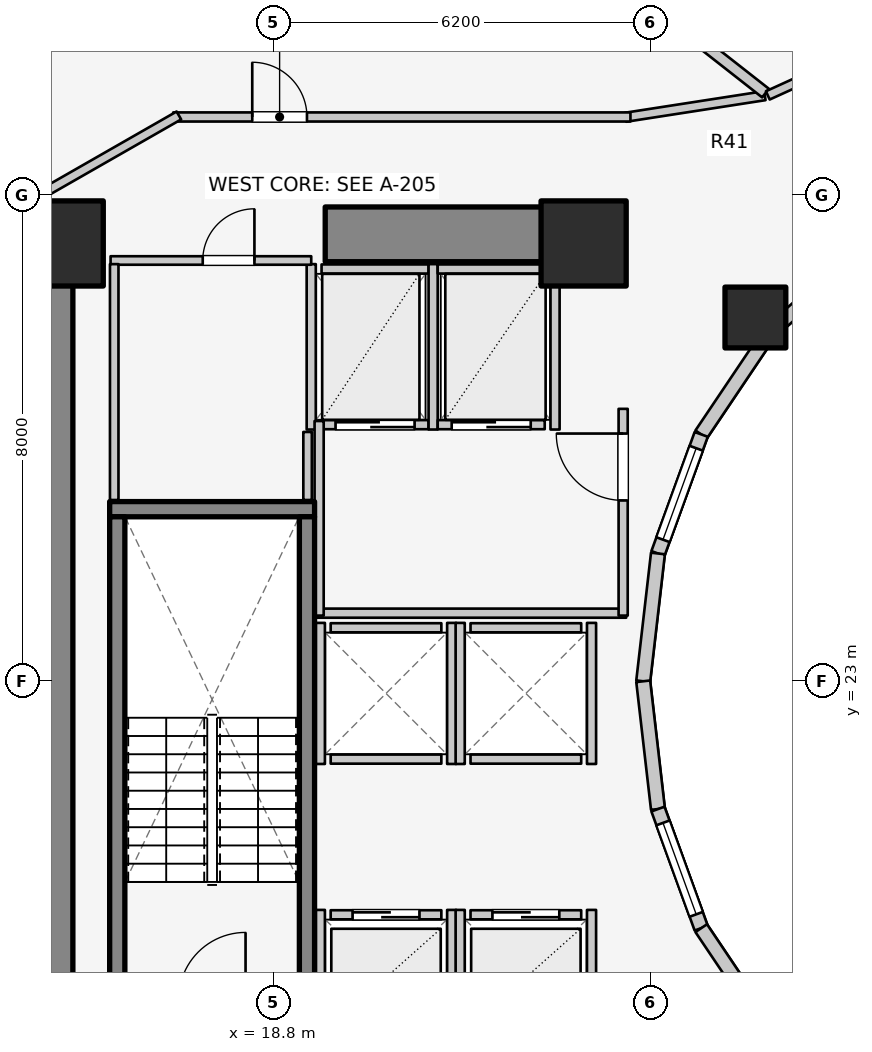
"""IFC4 building model, lengths in metres.
Left out: names, types, materials, properties, quantities, classifications, styles, units other than length and angle.
Written with IfcOpenShell. Run it as: python <this file> out.ifc"""

import sys

from ifc_helpers import new_model, si_unit, direction, frame, frame_2d, origin, origin_2d, place, context, subcontext, project, spatial, rectangle, extrude, element, fill, save


model = new_model("IFC4")
c1 = context("Model", 3, precision=1e-05, world=origin(), true_north=direction((0.0, 1.0)))
c2 = subcontext(c1, "Body", "Model", "MODEL_VIEW")
j1 = project(units=[si_unit("LENGTHUNIT", "METRE"), si_unit("PLANEANGLEUNIT", "RADIAN")], contexts=[c1])
p1 = place(None, origin())
s1 = spatial("IfcSite", under=j1, at=p1, CompositionType="ELEMENT")
p2 = place(p1, origin())
s2 = spatial("IfcBuilding", under=s1, at=p2, CompositionType="ELEMENT")
p3 = place(p2, frame((0.0, 0.0, 36.9)))
s3 = spatial("IfcBuildingStorey", under=s2, at=p3, CompositionType="ELEMENT", Elevation=36.9)
p4 = place(p3, frame((15.05, 17.05, 0.0), z_axis=(0.0, 0.0, 1.0), x_axis=(0.0, 1.0, 0.0)))
e1 = element("IfcWall", 1, at=p4, inside=s3, PredefinedType="SHEAR", context=c2, shape_type="SweptSolid", body=[
    extrude(rectangle(XDim=12.8, YDim=0.9, at=frame_2d((6.4, 0.0))), origin(), (0.0, 0.0, 1.0), 3.1),
])
p5 = place(p3, frame((19.65, 30.35, 0.0), z_axis=(0.0, 0.0, 1.0), x_axis=(1.0, 0.0, 0.0)))
e2 = element("IfcWall", 2, at=p5, inside=s3, PredefinedType="SHEAR", context=c2, shape_type="SweptSolid", body=[
    extrude(rectangle(XDim=4.5, YDim=0.9, at=frame_2d((2.25, 0.0))), origin(), (0.0, 0.0, 1.0), 3.1),
])
p6 = place(p3, frame((16.105, 25.83, 0.0), z_axis=(0.0, 0.0, 1.0), x_axis=(1.0, 0.0, 0.0)))
e3 = element("IfcWall", 3, at=p6, inside=s3, PredefinedType="SOLIDWALL", context=c2, shape_type="SweptSolid", body=[
    extrude(rectangle(XDim=3.37, YDim=0.25, at=frame_2d((1.685, 0.0))), origin(), (0.0, 0.0, 1.0), 3.1),
])
for number, where, z_axis, x_axis in (
    (4, (16.23, 17.895, 0.0), (0.0, 0.0, 1.0), (0.0, 1.0, 0.0)),
    (5, (19.35, 17.895, 0.0), (0.0, 0.0, 1.0), (0.0, 1.0, 0.0)),
):
    element("IfcWall", number, at=place(p3, frame(where, z_axis=z_axis, x_axis=x_axis)), inside=s3, PredefinedType="SOLIDWALL", context=c2, shape_type="SweptSolid", body=[
        extrude(rectangle(XDim=7.81, YDim=0.25, at=frame_2d((3.905, 0.0))), origin(), (0.0, 0.0, 1.0), 3.1),
    ])
for number, where, z_axis, x_axis in (
    (6, (23.9, 30.2, 0.0), (0.0, 0.0, 1.0), (1.0, 0.0, 0.0)),
    (7, (15.3, 30.2, 0.0), (0.0, 0.0, 1.0), (1.0, 0.0, 0.0)),
):
    element("IfcColumn", number, at=place(p3, frame(where, z_axis=z_axis, x_axis=x_axis)), inside=s3, PredefinedType="COLUMN", context=c2, shape_type="SweptSolid", body=[
        extrude(rectangle(XDim=1.4, YDim=1.4, at=origin_2d()), origin(), (0.0, 0.0, 1.0), 3.1),
    ])
p7 = place(p3, frame((26.725, 28.982, 0.0), z_axis=(0.0, 0.0, 1.0), x_axis=(1.0, 0.0, 0.0)))
e8 = element("IfcColumn", 8, at=p7, inside=s3, PredefinedType="COLUMN", context=c2, shape_type="SweptSolid", body=[
    extrude(rectangle(XDim=1.0, YDim=1.0, at=origin_2d()), origin(), (0.0, 0.0, 1.0), 3.1),
])
p8 = place(p3, frame((28.44, 30.032, 0.0), z_axis=(0.0, 0.0, 1.0), x_axis=(-0.752576694707, -0.658504607869, 0.0)))
e9 = element("IfcWall", 9, at=p8, inside=s3, PredefinedType="STANDARD", context=c2, shape_type="SweptSolid", body=[
    extrude(rectangle(XDim=1.959, YDim=0.23, at=frame_2d((0.98, 0.0))), origin(), (0.0, 0.0, 1.0), 2.16),
])
p9 = place(p3, frame((26.965, 28.742, 0.0), z_axis=(0.0, 0.0, 1.0), x_axis=(-0.558197800898, -0.829707909492, 0.0)))
e10 = element("IfcWall", 10, at=p9, inside=s3, PredefinedType="STANDARD", context=c2, shape_type="SweptSolid", body=[
    extrude(rectangle(XDim=2.027, YDim=0.23, at=frame_2d((1.013, 0.0))), origin(), (0.0, 0.0, 1.0), 2.16),
])
p10 = place(p3, frame((25.834, 27.06, 0.0), z_axis=(0.0, 0.0, 1.0), x_axis=(-0.341423187295, -0.93990968033, 0.0)))
e11 = element("IfcWall", 11, at=p10, inside=s3, PredefinedType="STANDARD", context=c2, shape_type="SweptSolid", body=[
    extrude(rectangle(XDim=2.084, YDim=0.23, at=frame_2d((1.042, 0.0))), origin(), (0.0, 0.0, 1.0), 2.84),
])
p11 = place(p10, frame((0.242, 0.0, 0.85)))
e12 = element("IfcOpeningElement", 12, at=p11, cuts=e11, PredefinedType="OPENING", context=c2, shape_type="SweptSolid", body=[
    extrude(rectangle(XDim=1.6, YDim=1.65, at=frame_2d((0.8, 0.825))), frame((0.0, 0.125, 0.0), z_axis=(0.0, -1.0, 0.0), x_axis=(1.0, 0.0, 0.0)), (0.0, 0.0, 1.0), 0.25),
])
for number, where, z_axis, x_axis in (
    (13, (25.123, 25.102, 0.0), (0.0, 0.0, 1.0), (-0.115, -0.993, 0.0)),
    (14, (24.88, 23.0, 0.0), (0.0, 0.0, 1.0), (0.115, -0.993, 0.0)),
):
    element("IfcWall", number, at=place(p3, frame(where, z_axis=z_axis, x_axis=x_axis)), inside=s3, PredefinedType="STANDARD", context=c2, shape_type="SweptSolid", body=[
        extrude(rectangle(XDim=2.115, YDim=0.23, at=frame_2d((1.058, 0.0))), origin(), (0.0, 0.0, 1.0), 2.84),
    ])
p12 = place(p3, frame((25.123, 20.898, 0.0), z_axis=(0.0, 0.0, 1.0), x_axis=(0.341423187295, -0.93990968033, 0.0)))
e15 = element("IfcWall", 15, at=p12, inside=s3, PredefinedType="STANDARD", context=c2, shape_type="SweptSolid", body=[
    extrude(rectangle(XDim=2.084, YDim=0.23, at=frame_2d((1.042, 0.0))), origin(), (0.0, 0.0, 1.0), 2.84),
])
p13 = place(p12, frame((0.242, 0.0, 0.85)))
e16 = element("IfcOpeningElement", 16, at=p13, cuts=e15, PredefinedType="OPENING", context=c2, shape_type="SweptSolid", body=[
    extrude(rectangle(XDim=1.6, YDim=1.65, at=frame_2d((0.8, 0.825))), frame((0.0, 0.125, 0.0), z_axis=(0.0, -1.0, 0.0), x_axis=(1.0, 0.0, 0.0)), (0.0, 0.0, 1.0), 0.25),
])
p14 = place(p3, frame((25.834, 18.94, 0.0), z_axis=(0.0, 0.0, 1.0), x_axis=(0.558197800898, -0.829707909492, 0.0)))
e17 = element("IfcWall", 17, at=p14, inside=s3, PredefinedType="STANDARD", context=c2, shape_type="SweptSolid", body=[
    extrude(rectangle(XDim=2.027, YDim=0.23, at=frame_2d((1.013, 0.0))), origin(), (0.0, 0.0, 1.0), 2.16),
])
p15 = place(p3, frame((19.74, 19.16, 0.0), z_axis=(0.0, 0.0, 1.0), x_axis=(1.0, 0.0, 0.0)))
e18 = element("IfcWall", 18, at=p15, inside=s3, PredefinedType="SOLIDWALL", context=c2, shape_type="SweptSolid", body=[
    extrude(rectangle(XDim=1.82, YDim=0.15, at=frame_2d((0.91, 0.0))), origin(), (0.0, 0.0, 1.0), 2.855),
])
p16 = place(p15, frame((0.36, 0.0, 0.0)))
e19 = element("IfcOpeningElement", 19, at=p16, cuts=e18, PredefinedType="OPENING", context=c2, shape_type="SweptSolid", body=[
    extrude(rectangle(XDim=1.1, YDim=2.1, at=frame_2d((0.55, 1.05))), frame((0.0, 0.085, 0.0), z_axis=(0.0, -1.0, 0.0), x_axis=(1.0, 0.0, 0.0)), (0.0, 0.0, 1.0), 0.17),
])
p17 = place(p3, frame((19.57, 17.02, 0.0), z_axis=(0.0, 0.0, 1.0), x_axis=(0.0, 1.0, 0.0)))
e20 = element("IfcWall", 20, at=p17, inside=s3, PredefinedType="SOLIDWALL", context=c2, shape_type="SweptSolid", body=[
    extrude(rectangle(XDim=2.22, YDim=0.15, at=frame_2d((1.11, 0.0))), origin(), (0.0, 0.0, 1.0), 2.12),
])
p18 = place(p3, frame((21.73, 17.02, 0.0), z_axis=(0.0, 0.0, 1.0), x_axis=(0.0, 1.0, 0.0)))
e21 = element("IfcWall", 21, at=p18, inside=s3, PredefinedType="SOLIDWALL", context=c2, shape_type="SweptSolid", body=[
    extrude(rectangle(XDim=2.22, YDim=0.15, at=frame_2d((1.11, 0.0))), origin(), (0.0, 0.0, 1.0), 2.855),
])
p19 = place(p3, frame((22.04, 19.16, 0.0), z_axis=(0.0, 0.0, 1.0), x_axis=(1.0, 0.0, 0.0)))
e22 = element("IfcWall", 22, at=p19, inside=s3, PredefinedType="SOLIDWALL", context=c2, shape_type="SweptSolid", body=[
    extrude(rectangle(XDim=1.82, YDim=0.15, at=frame_2d((0.91, 0.0))), origin(), (0.0, 0.0, 1.0), 2.12),
])
p20 = place(p19, frame((0.36, 0.0, 0.0)))
e23 = element("IfcOpeningElement", 23, at=p20, cuts=e22, PredefinedType="OPENING", context=c2, shape_type="SweptSolid", body=[
    extrude(rectangle(XDim=1.1, YDim=2.1, at=frame_2d((0.55, 1.05))), frame((0.0, 0.085, 0.0), z_axis=(0.0, -1.0, 0.0), x_axis=(1.0, 0.0, 0.0)), (0.0, 0.0, 1.0), 0.17),
])
p21 = place(p3, frame((21.87, 17.02, 0.0), z_axis=(0.0, 0.0, 1.0), x_axis=(0.0, 1.0, 0.0)))
e24 = element("IfcWall", 24, at=p21, inside=s3, PredefinedType="SOLIDWALL", context=c2, shape_type="SweptSolid", body=[
    extrude(rectangle(XDim=2.22, YDim=0.15, at=frame_2d((1.11, 0.0))), origin(), (0.0, 0.0, 1.0), 2.855),
])
p22 = place(p3, frame((24.03, 17.02, 0.0), z_axis=(0.0, 0.0, 1.0), x_axis=(0.0, 1.0, 0.0)))
e25 = element("IfcWall", 25, at=p22, inside=s3, PredefinedType="SOLIDWALL", context=c2, shape_type="SweptSolid", body=[
    extrude(rectangle(XDim=2.22, YDim=0.15, at=frame_2d((1.11, 0.0))), origin(), (0.0, 0.0, 1.0), 2.12),
])
for number, where, z_axis, x_axis in (
    (26, (19.74, 21.72, 0.0), (0.0, 0.0, 1.0), (1.0, 0.0, 0.0)),
    (27, (19.74, 23.88, 0.0), (0.0, 0.0, 1.0), (1.0, 0.0, 0.0)),
):
    element("IfcWall", number, at=place(p3, frame(where, z_axis=z_axis, x_axis=x_axis)), inside=s3, PredefinedType="SOLIDWALL", context=c2, shape_type="SweptSolid", body=[
        extrude(rectangle(XDim=1.82, YDim=0.15, at=frame_2d((0.91, 0.0))), origin(), (0.0, 0.0, 1.0), 2.855),
    ])
for number, where, z_axis, x_axis in (
    (28, (19.57, 21.64, 0.0), (0.0, 0.0, 1.0), (0.0, 1.0, 0.0)),
    (29, (21.73, 21.64, 0.0), (0.0, 0.0, 1.0), (0.0, 1.0, 0.0)),
):
    element("IfcWall", number, at=place(p3, frame(where, z_axis=z_axis, x_axis=x_axis)), inside=s3, PredefinedType="SOLIDWALL", context=c2, shape_type="SweptSolid", body=[
        extrude(rectangle(XDim=2.32, YDim=0.15, at=frame_2d((1.16, 0.0))), origin(), (0.0, 0.0, 1.0), 2.855),
    ])
for number, where, z_axis, x_axis in (
    (30, (22.04, 21.72, 0.0), (0.0, 0.0, 1.0), (1.0, 0.0, 0.0)),
    (31, (22.04, 23.88, 0.0), (0.0, 0.0, 1.0), (1.0, 0.0, 0.0)),
):
    element("IfcWall", number, at=place(p3, frame(where, z_axis=z_axis, x_axis=x_axis)), inside=s3, PredefinedType="SOLIDWALL", context=c2, shape_type="SweptSolid", body=[
        extrude(rectangle(XDim=1.82, YDim=0.15, at=frame_2d((0.91, 0.0))), origin(), (0.0, 0.0, 1.0), 2.12),
    ])
p23 = place(p3, frame((21.87, 21.64, 0.0), z_axis=(0.0, 0.0, 1.0), x_axis=(0.0, 1.0, 0.0)))
e32 = element("IfcWall", 32, at=p23, inside=s3, PredefinedType="SOLIDWALL", context=c2, shape_type="SweptSolid", body=[
    extrude(rectangle(XDim=2.32, YDim=0.15, at=frame_2d((1.16, 0.0))), origin(), (0.0, 0.0, 1.0), 2.855),
])
p24 = place(p3, frame((24.03, 21.64, 0.0), z_axis=(0.0, 0.0, 1.0), x_axis=(0.0, 1.0, 0.0)))
e33 = element("IfcWall", 33, at=p24, inside=s3, PredefinedType="SOLIDWALL", context=c2, shape_type="SweptSolid", body=[
    extrude(rectangle(XDim=2.32, YDim=0.15, at=frame_2d((1.16, 0.0))), origin(), (0.0, 0.0, 1.0), 2.12),
])
p25 = place(p3, frame((19.59, 27.22, 0.0), z_axis=(0.0, 0.0, 1.0), x_axis=(1.0, 0.0, 0.0)))
e34 = element("IfcWall", 34, at=p25, inside=s3, PredefinedType="SOLIDWALL", context=c2, shape_type="SweptSolid", body=[
    extrude(rectangle(XDim=1.76, YDim=0.15, at=frame_2d((0.88, 0.0))), origin(), (0.0, 0.0, 1.0), 2.855),
])
p26 = place(p25, frame((0.23, 0.0, 0.0)))
e35 = element("IfcOpeningElement", 35, at=p26, cuts=e34, PredefinedType="OPENING", context=c2, shape_type="SweptSolid", body=[
    extrude(rectangle(XDim=1.3, YDim=2.1, at=frame_2d((0.65, 1.05))), frame((0.0, 0.085, 0.0), z_axis=(0.0, -1.0, 0.0), x_axis=(1.0, 0.0, 0.0)), (0.0, 0.0, 1.0), 0.17),
])
p27 = place(p3, frame((19.59, 29.78, 0.0), z_axis=(0.0, 0.0, 1.0), x_axis=(1.0, 0.0, 0.0)))
e36 = element("IfcWall", 36, at=p27, inside=s3, PredefinedType="SOLIDWALL", context=c2, shape_type="SweptSolid", body=[
    extrude(rectangle(XDim=1.76, YDim=0.15, at=frame_2d((0.88, 0.0))), origin(), (0.0, 0.0, 1.0), 2.855),
])
for number, where, z_axis, x_axis in (
    (37, (19.42, 27.14, 0.0), (0.0, 0.0, 1.0), (0.0, 1.0, 0.0)),
    (38, (21.425, 27.14, 0.0), (0.0, 0.0, 1.0), (0.0, 1.0, 0.0)),
):
    element("IfcWall", number, at=place(p3, frame(where, z_axis=z_axis, x_axis=x_axis)), inside=s3, PredefinedType="SOLIDWALL", context=c2, shape_type="SweptSolid", body=[
        extrude(rectangle(XDim=2.72, YDim=0.15, at=frame_2d((1.36, 0.0))), origin(), (0.0, 0.0, 1.0), 2.855),
    ])
p28 = place(p3, frame((21.5, 27.22, 0.0), z_axis=(0.0, 0.0, 1.0), x_axis=(1.0, 0.0, 0.0)))
e39 = element("IfcWall", 39, at=p28, inside=s3, PredefinedType="SOLIDWALL", context=c2, shape_type="SweptSolid", body=[
    extrude(rectangle(XDim=1.76, YDim=0.15, at=frame_2d((0.88, 0.0))), origin(), (0.0, 0.0, 1.0), 2.855),
])
p29 = place(p28, frame((0.23, 0.0, 0.0)))
e40 = element("IfcOpeningElement", 40, at=p29, cuts=e39, PredefinedType="OPENING", context=c2, shape_type="SweptSolid", body=[
    extrude(rectangle(XDim=1.3, YDim=2.1, at=frame_2d((0.65, 1.05))), frame((0.0, 0.085, 0.0), z_axis=(0.0, -1.0, 0.0), x_axis=(1.0, 0.0, 0.0)), (0.0, 0.0, 1.0), 0.17),
])
p30 = place(p3, frame((21.5, 29.78, 0.0), z_axis=(0.0, 0.0, 1.0), x_axis=(1.0, 0.0, 0.0)))
e41 = element("IfcWall", 41, at=p30, inside=s3, PredefinedType="SOLIDWALL", context=c2, shape_type="SweptSolid", body=[
    extrude(rectangle(XDim=1.76, YDim=0.15, at=frame_2d((0.88, 0.0))), origin(), (0.0, 0.0, 1.0), 2.855),
])
p31 = place(p3, frame((23.43, 27.14, 0.0), z_axis=(0.0, 0.0, 1.0), x_axis=(0.0, 1.0, 0.0)))
e42 = element("IfcWall", 42, at=p31, inside=s3, PredefinedType="SOLIDWALL", context=c2, shape_type="SweptSolid", body=[
    extrude(rectangle(XDim=2.72, YDim=0.15, at=frame_2d((1.36, 0.0))), origin(), (0.0, 0.0, 1.0), 2.855),
])
p32 = place(p3, frame((19.52, 24.12, 0.0), z_axis=(0.0, 0.0, 1.0), x_axis=(1.0, 0.0, 0.0)))
e43 = element("IfcWall", 43, at=p32, inside=s3, PredefinedType="PARTITIONING", context=c2, shape_type="SweptSolid", body=[
    extrude(rectangle(XDim=5.08, YDim=0.15, at=frame_2d((2.54, 0.0))), origin(), (0.0, 0.0, 1.0), 2.12),
])
p33 = place(p3, frame((19.55, 24.08, 0.0), z_axis=(0.0, 0.0, 1.0), x_axis=(0.0, 1.0, 0.0)))
e44 = element("IfcWall", 44, at=p33, inside=s3, PredefinedType="PARTITIONING", context=c2, shape_type="SweptSolid", body=[
    extrude(rectangle(XDim=3.2, YDim=0.15, at=frame_2d((1.6, 0.0))), origin(), (0.0, 0.0, 1.0), 2.855),
])
p34 = place(p3, frame((24.55, 24.08, 0.0), z_axis=(0.0, 0.0, 1.0), x_axis=(0.0, 1.0, 0.0)))
e45 = element("IfcWall", 45, at=p34, inside=s3, PredefinedType="PARTITIONING", context=c2, shape_type="SweptSolid", body=[
    extrude(rectangle(XDim=3.4, YDim=0.15, at=frame_2d((1.7, 0.0))), origin(), (0.0, 0.0, 1.0), 2.855),
])
p35 = place(p34, frame((1.894, 0.0, 0.0)))
e46 = element("IfcOpeningElement", 46, at=p35, cuts=e45, PredefinedType="OPENING", context=c2, shape_type="SweptSolid", body=[
    extrude(rectangle(XDim=1.1, YDim=2.1, at=frame_2d((0.55, 1.05))), frame((0.0, 0.085, 0.0), z_axis=(0.0, -1.0, 0.0), x_axis=(1.0, 0.0, 0.0)), (0.0, 0.0, 1.0), 0.17),
])
p36 = place(p3, frame((16.12, 29.92, 0.0), z_axis=(0.0, 0.0, 1.0), x_axis=(1.0, 0.0, 0.0)))
e47 = element("IfcWall", 47, at=p36, inside=s3, PredefinedType="PLUMBINGWALL", context=c2, shape_type="SweptSolid", body=[
    extrude(rectangle(XDim=3.3, YDim=0.14, at=frame_2d((1.65, 0.0))), origin(), (0.0, 0.0, 1.0), 2.855),
])
p37 = place(p36, frame((1.516, 0.0, 0.0)))
e48 = element("IfcOpeningElement", 48, at=p37, cuts=e47, PredefinedType="OPENING", context=c2, shape_type="SweptSolid", body=[
    extrude(rectangle(XDim=0.85, YDim=2.05, at=frame_2d((0.425, 1.025))), frame((0.0, 0.08, 0.0), z_axis=(0.0, -1.0, 0.0), x_axis=(1.0, 0.0, 0.0)), (0.0, 0.0, 1.0), 0.16),
])
p38 = place(p3, frame((16.18, 25.98, 0.0), z_axis=(0.0, 0.0, 1.0), x_axis=(0.0, 1.0, 0.0)))
e49 = element("IfcWall", 49, at=p38, inside=s3, PredefinedType="PLUMBINGWALL", context=c2, shape_type="SweptSolid", body=[
    extrude(rectangle(XDim=3.88, YDim=0.14, at=frame_2d((1.94, 0.0))), origin(), (0.0, 0.0, 1.0), 2.855),
])
p39 = place(p3, frame((19.36, 25.98, 0.0), z_axis=(0.0, 0.0, 1.0), x_axis=(0.0, 1.0, 0.0)))
e50 = element("IfcWall", 50, at=p39, inside=s3, PredefinedType="PLUMBINGWALL", context=c2, shape_type="SweptSolid", body=[
    extrude(rectangle(XDim=1.12, YDim=0.14, at=frame_2d((0.56, 0.0))), origin(), (0.0, 0.0, 1.0), 2.855),
])
p40 = place(p3, frame((26.881, 32.631, 0.0), z_axis=(0.0, 0.0, 1.0), x_axis=(-0.988184633586, -0.153268163508, 0.0)))
e51 = element("IfcWall", 51, at=p40, inside=s3, PredefinedType="PARTITIONING", context=c2, shape_type="SweptSolid", body=[
    extrude(rectangle(XDim=2.318, YDim=0.15, at=frame_2d((1.159, 0.0))), origin(), (0.0, 0.0, 1.0), 2.237),
])
p41 = place(p3, frame((17.15, 32.28, 0.0), z_axis=(0.0, 0.0, 1.0), x_axis=(1.0, 0.0, 0.0)))
e52 = element("IfcWall", 52, at=p41, inside=s3, PredefinedType="PARTITIONING", context=c2, shape_type="SweptSolid", body=[
    extrude(rectangle(XDim=7.52, YDim=0.15, at=frame_2d((3.76, 0.0))), origin(), (0.0, 0.0, 1.0), 2.237),
])
p42 = place(p41, frame((1.3, 0.0, 0.0)))
e53 = element("IfcOpeningElement", 53, at=p42, cuts=e52, PredefinedType="OPENING", context=c2, shape_type="SweptSolid", body=[
    extrude(rectangle(XDim=0.9, YDim=2.1, at=frame_2d((0.45, 1.05))), frame((0.0, 0.085, 0.0), z_axis=(0.0, -1.0, 0.0), x_axis=(1.0, 0.0, 0.0)), (0.0, 0.0, 1.0), 0.17),
])
p43 = place(p3, frame((17.243, 32.305, 0.0), z_axis=(0.0, 0.0, 1.0), x_axis=(-0.867991349648, -0.496579315857, 0.0)))
e54 = element("IfcWall", 54, at=p43, inside=s3, PredefinedType="PARTITIONING", context=c2, shape_type="SweptSolid", body=[
    extrude(rectangle(XDim=2.567, YDim=0.15, at=frame_2d((1.283, 0.0))), origin(), (0.0, 0.0, 1.0), 2.069),
])
p44 = place(p3, frame((26.892, 32.673, 0.0), z_axis=(0.0, 0.0, 1.0), x_axis=(-0.78700868866, 0.616941912966, 0.0)))
e55 = element("IfcWall", 55, at=p44, inside=s3, PredefinedType="PARTITIONING", context=c2, shape_type="SweptSolid", body=[
    extrude(rectangle(XDim=10.583, YDim=0.18, at=frame_2d((5.292, 0.0))), origin(), (0.0, 0.0, 1.0), 2.237),
])
p45 = place(p3, frame((29.385, 33.753, 0.0), z_axis=(0.0, 0.0, 1.0), x_axis=(-0.910186679378, -0.414198272186, 0.0)))
e56 = element("IfcWall", 56, at=p45, inside=s3, PredefinedType="PARTITIONING", context=c2, shape_type="SweptSolid", body=[
    extrude(rectangle(XDim=2.698, YDim=0.15, at=frame_2d((1.349, 0.0))), origin(), (0.0, 0.0, 1.0), 2.237),
])
p46 = place(p45, frame((0.874, 0.0, 0.0)))
e57 = element("IfcOpeningElement", 57, at=p46, cuts=e56, PredefinedType="OPENING", context=c2, shape_type="SweptSolid", body=[
    extrude(rectangle(XDim=0.95, YDim=2.1, at=frame_2d((0.475, 1.05))), frame((0.0, 0.085, 0.0), z_axis=(0.0, -1.0, 0.0), x_axis=(1.0, 0.0, 0.0)), (0.0, 0.0, 1.0), 0.17),
])
p47 = place(p11, origin())
e58 = element("IfcWindow", 58, at=p47, inside=s3, PartitioningType="SINGLE_PANEL", PredefinedType="WINDOW", context=c2, shape_type="SweptSolid", body=[
    extrude(rectangle(XDim=1.6, YDim=1.65, at=frame_2d((0.8, 0.825))), frame((0.0, 0.03, 0.0), z_axis=(0.0, -1.0, 0.0), x_axis=(1.0, 0.0, 0.0)), (0.0, 0.0, 1.0), 0.06),
])
fill(e12, e58)
p48 = place(p13, origin())
e59 = element("IfcWindow", 59, at=p48, inside=s3, PartitioningType="SINGLE_PANEL", PredefinedType="WINDOW", context=c2, shape_type="SweptSolid", body=[
    extrude(rectangle(XDim=1.6, YDim=1.65, at=frame_2d((0.8, 0.825))), frame((0.0, 0.03, 0.0), z_axis=(0.0, -1.0, 0.0), x_axis=(1.0, 0.0, 0.0)), (0.0, 0.0, 1.0), 0.06),
])
fill(e16, e59)
p49 = place(p16, origin())
e60 = element("IfcDoor", 60, at=p49, inside=s3, OperationType="DOUBLE_DOOR_SLIDING", PredefinedType="DOOR", context=c2, shape_type="SweptSolid", body=[
    extrude(rectangle(XDim=1.1, YDim=2.1, at=frame_2d((0.55, 1.05))), frame((0.0, 0.025, 0.0), z_axis=(0.0, -1.0, 0.0), x_axis=(1.0, 0.0, 0.0)), (0.0, 0.0, 1.0), 0.05),
])
fill(e19, e60)
p50 = place(p20, origin())
e61 = element("IfcDoor", 61, at=p50, inside=s3, OperationType="DOUBLE_DOOR_SLIDING", PredefinedType="DOOR", context=c2, shape_type="SweptSolid", body=[
    extrude(rectangle(XDim=1.1, YDim=2.1, at=frame_2d((0.55, 1.05))), frame((0.0, 0.025, 0.0), z_axis=(0.0, -1.0, 0.0), x_axis=(1.0, 0.0, 0.0)), (0.0, 0.0, 1.0), 0.05),
])
fill(e23, e61)
p51 = place(p26, origin())
e62 = element("IfcDoor", 62, at=p51, inside=s3, OperationType="DOUBLE_DOOR_SLIDING", PredefinedType="DOOR", context=c2, shape_type="SweptSolid", body=[
    extrude(rectangle(XDim=1.3, YDim=2.1, at=frame_2d((0.65, 1.05))), frame((0.0, 0.025, 0.0), z_axis=(0.0, -1.0, 0.0), x_axis=(1.0, 0.0, 0.0)), (0.0, 0.0, 1.0), 0.05),
])
fill(e35, e62)
p52 = place(p29, origin())
e63 = element("IfcDoor", 63, at=p52, inside=s3, OperationType="DOUBLE_DOOR_SLIDING", PredefinedType="DOOR", context=c2, shape_type="SweptSolid", body=[
    extrude(rectangle(XDim=1.3, YDim=2.1, at=frame_2d((0.65, 1.05))), frame((0.0, 0.025, 0.0), z_axis=(0.0, -1.0, 0.0), x_axis=(1.0, 0.0, 0.0)), (0.0, 0.0, 1.0), 0.05),
])
fill(e40, e63)
p53 = place(p35, origin())
e64 = element("IfcDoor", 64, at=p53, inside=s3, OperationType="SINGLE_SWING_RIGHT", PredefinedType="DOOR", context=c2, shape_type="SweptSolid", body=[
    extrude(rectangle(XDim=1.1, YDim=2.1, at=frame_2d((0.55, 1.05))), frame((0.0, 0.025, 0.0), z_axis=(0.0, -1.0, 0.0), x_axis=(1.0, 0.0, 0.0)), (0.0, 0.0, 1.0), 0.05),
])
fill(e46, e64)
p54 = place(p37, origin())
e65 = element("IfcDoor", 65, at=p54, inside=s3, OperationType="SINGLE_SWING_RIGHT", PredefinedType="DOOR", context=c2, shape_type="SweptSolid", body=[
    extrude(rectangle(XDim=0.85, YDim=2.05, at=frame_2d((0.425, 1.025))), frame((0.0, 0.025, 0.0), z_axis=(0.0, -1.0, 0.0), x_axis=(1.0, 0.0, 0.0)), (0.0, 0.0, 1.0), 0.05),
])
fill(e48, e65)
p55 = place(p42, origin())
e66 = element("IfcDoor", 66, at=p55, inside=s3, OperationType="SINGLE_SWING_LEFT", PredefinedType="DOOR", context=c2, shape_type="SweptSolid", body=[
    extrude(rectangle(XDim=0.9, YDim=2.1, at=frame_2d((0.45, 1.05))), frame((0.0, 0.025, 0.0), z_axis=(0.0, -1.0, 0.0), x_axis=(1.0, 0.0, 0.0)), (0.0, 0.0, 1.0), 0.05),
])
fill(e53, e66)
save(model, sys.argv[1])
